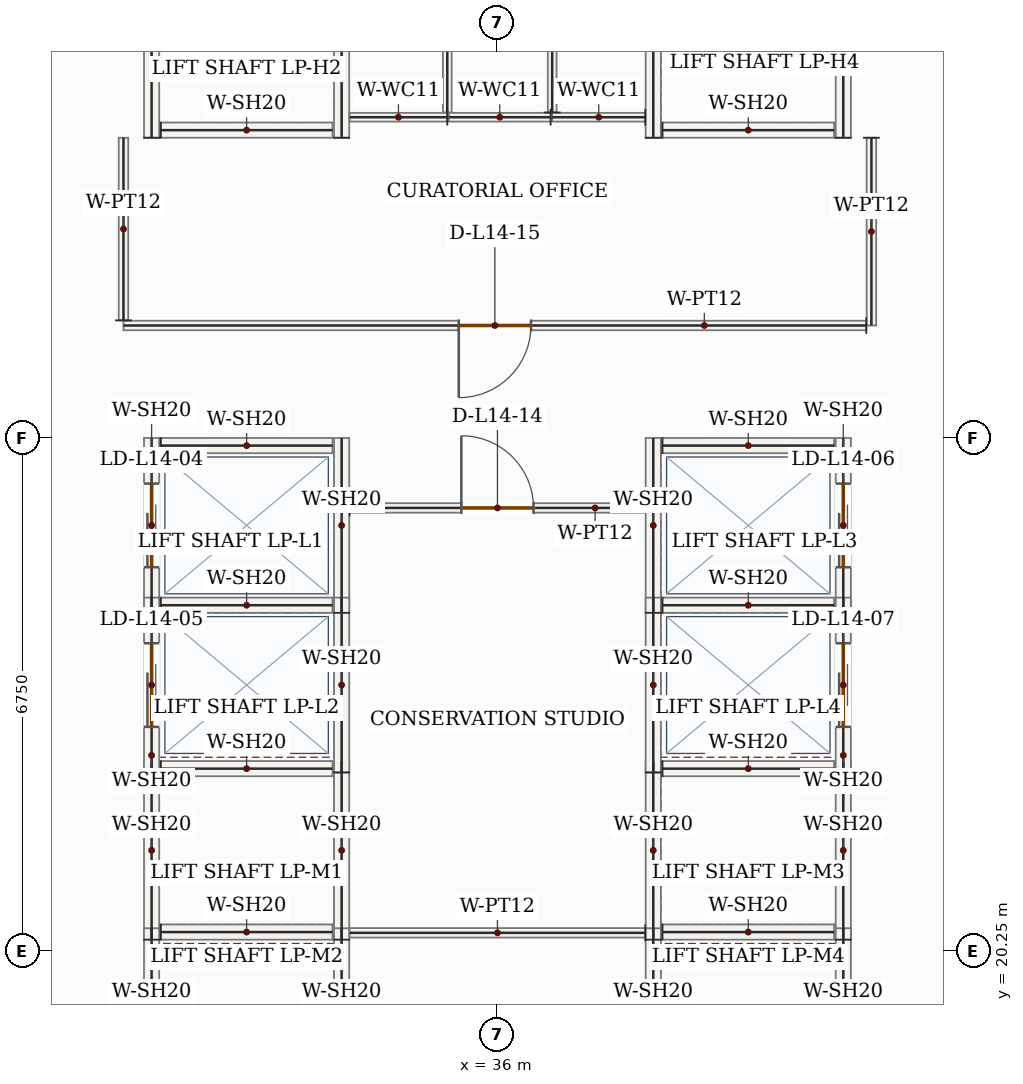
"""IFC4 building model, lengths in metres.
Left out: names, types, materials, properties, quantities, classifications, styles, units other than length and angle.
Written with IfcOpenShell. Run it as: python <this file> out.ifc"""

import sys

from ifc_helpers import new_model, si_unit, direction, frame, frame_2d, origin, place, context, subcontext, project, spatial, rectangle, extrude, source, transform, mapped, element, fill, save


model = new_model("IFC4")
c1 = context("Model", 3, precision=1e-05, world=origin(), true_north=direction((0.0, 1.0)))
c2 = subcontext(c1, "Body", "Model", "MODEL_VIEW")
j1 = project(units=[si_unit("LENGTHUNIT", "METRE"), si_unit("PLANEANGLEUNIT", "RADIAN")], contexts=[c1])
p1 = place(None, origin())
s1 = spatial("IfcSite", under=j1, at=p1, CompositionType="ELEMENT")
p2 = place(p1, origin())
s2 = spatial("IfcBuilding", under=s1, at=p2, CompositionType="ELEMENT")
p3 = place(p2, frame((0.0, 0.0, 66.9)))
s3 = spatial("IfcBuildingStorey", under=s2, at=p3, CompositionType="ELEMENT", Elevation=66.9)
m1 = source(origin(), c2, "Body", "SweptSolid", [
    extrude(rectangle(XDim=2.4, YDim=0.2, at=frame_2d((1.2, 0.0))), origin(), (0.0, 0.0, 1.0), 3.95),
])
for number, where, z_axis, x_axis in (
    (1, (31.45, 30.95, 0.0), (0.0, 0.0, 1.0), (0.0, 1.0, 0.0)),
    (2, (33.95, 30.95, 0.0), (0.0, 0.0, 1.0), (0.0, 1.0, 0.0)),
):
    element("IfcWall", number, at=place(p3, frame(where, z_axis=z_axis, x_axis=x_axis)), inside=s3, PredefinedType="SOLIDWALL", context=c2, shape_type="MappedRepresentation", body=[
        mapped(m1, transform((0.0, 0.0, 0.0), x_axis=(1.0, 0.0, 0.0), y_axis=(0.0, 1.0, 0.0), z_axis=(0.0, 0.0, 1.0), scale=1.0)),
    ])
m2 = source(origin(), c2, "Body", "SweptSolid", [
    extrude(rectangle(XDim=2.26, YDim=0.2, at=frame_2d((1.13, 0.0))), origin(), (0.0, 0.0, 1.0), 3.95),
])
p4 = place(p3, frame((31.57, 31.05, 0.0), z_axis=(0.0, 0.0, 1.0), x_axis=(1.0, 0.0, 0.0)))
e3 = element("IfcWall", 3, at=p4, inside=s3, PredefinedType="SOLIDWALL", context=c2, shape_type="MappedRepresentation", body=[
    mapped(m2, transform((0.0, 0.0, 0.0), x_axis=(1.0, 0.0, 0.0), y_axis=(0.0, 1.0, 0.0), z_axis=(0.0, 0.0, 1.0), scale=1.0)),
])
for number, where, z_axis, x_axis in (
    (4, (38.05, 30.95, 0.0), (0.0, 0.0, 1.0), (0.0, 1.0, 0.0)),
    (5, (40.55, 30.95, 0.0), (0.0, 0.0, 1.0), (0.0, 1.0, 0.0)),
):
    element("IfcWall", number, at=place(p3, frame(where, z_axis=z_axis, x_axis=x_axis)), inside=s3, PredefinedType="SOLIDWALL", context=c2, shape_type="MappedRepresentation", body=[
        mapped(m1, transform((0.0, 0.0, 0.0), x_axis=(1.0, 0.0, 0.0), y_axis=(0.0, 1.0, 0.0), z_axis=(0.0, 0.0, 1.0), scale=1.0)),
    ])
p5 = place(p3, frame((38.17, 31.05, 0.0), z_axis=(0.0, 0.0, 1.0), x_axis=(1.0, 0.0, 0.0)))
e6 = element("IfcWall", 6, at=p5, inside=s3, PredefinedType="SOLIDWALL", context=c2, shape_type="MappedRepresentation", body=[
    mapped(m2, transform((0.0, 0.0, 0.0), x_axis=(1.0, 0.0, 0.0), y_axis=(0.0, 1.0, 0.0), z_axis=(0.0, 0.0, 1.0), scale=1.0)),
])
m3 = source(origin(), c2, "Body", "SweptSolid", [
    extrude(rectangle(XDim=2.35, YDim=0.2, at=frame_2d((1.175, 0.0))), origin(), (0.0, 0.0, 1.0), 3.95),
])
for number, where, z_axis, x_axis in (
    (7, (31.45, 20.4, 0.0), (0.0, 0.0, 1.0), (0.0, 1.0, 0.0)),
    (8, (33.95, 20.4, 0.0), (0.0, 0.0, 1.0), (0.0, 1.0, 0.0)),
):
    element("IfcWall", number, at=place(p3, frame(where, z_axis=z_axis, x_axis=x_axis)), inside=s3, PredefinedType="SOLIDWALL", context=c2, shape_type="MappedRepresentation", body=[
        mapped(m3, transform((0.0, 0.0, 0.0), x_axis=(1.0, 0.0, 0.0), y_axis=(0.0, 1.0, 0.0), z_axis=(0.0, 0.0, 1.0), scale=1.0)),
    ])
for number, where, z_axis, x_axis in (
    (9, (31.57, 20.5, 0.0), (0.0, 0.0, 1.0), (1.0, 0.0, 0.0)),
    (10, (31.57, 22.65, 0.0), (0.0, 0.0, 1.0), (1.0, 0.0, 0.0)),
):
    element("IfcWall", number, at=place(p3, frame(where, z_axis=z_axis, x_axis=x_axis)), inside=s3, PredefinedType="SOLIDWALL", context=c2, shape_type="MappedRepresentation", body=[
        mapped(m2, transform((0.0, 0.0, 0.0), x_axis=(1.0, 0.0, 0.0), y_axis=(0.0, 1.0, 0.0), z_axis=(0.0, 0.0, 1.0), scale=1.0)),
    ])
for number, where, z_axis, x_axis in (
    (11, (31.45, 18.2, 0.0), (0.0, 0.0, 1.0), (0.0, 1.0, 0.0)),
    (12, (33.95, 18.2, 0.0), (0.0, 0.0, 1.0), (0.0, 1.0, 0.0)),
    (13, (38.05, 20.4, 0.0), (0.0, 0.0, 1.0), (0.0, 1.0, 0.0)),
    (14, (40.55, 20.4, 0.0), (0.0, 0.0, 1.0), (0.0, 1.0, 0.0)),
):
    element("IfcWall", number, at=place(p3, frame(where, z_axis=z_axis, x_axis=x_axis)), inside=s3, PredefinedType="SOLIDWALL", context=c2, shape_type="MappedRepresentation", body=[
        mapped(m3, transform((0.0, 0.0, 0.0), x_axis=(1.0, 0.0, 0.0), y_axis=(0.0, 1.0, 0.0), z_axis=(0.0, 0.0, 1.0), scale=1.0)),
    ])
for number, where, z_axis, x_axis in (
    (15, (38.17, 20.5, 0.0), (0.0, 0.0, 1.0), (1.0, 0.0, 0.0)),
    (16, (38.17, 22.65, 0.0), (0.0, 0.0, 1.0), (1.0, 0.0, 0.0)),
):
    element("IfcWall", number, at=place(p3, frame(where, z_axis=z_axis, x_axis=x_axis)), inside=s3, PredefinedType="SOLIDWALL", context=c2, shape_type="MappedRepresentation", body=[
        mapped(m2, transform((0.0, 0.0, 0.0), x_axis=(1.0, 0.0, 0.0), y_axis=(0.0, 1.0, 0.0), z_axis=(0.0, 0.0, 1.0), scale=1.0)),
    ])
for number, where, z_axis, x_axis in (
    (17, (38.05, 18.2, 0.0), (0.0, 0.0, 1.0), (0.0, 1.0, 0.0)),
    (18, (40.55, 18.2, 0.0), (0.0, 0.0, 1.0), (0.0, 1.0, 0.0)),
):
    element("IfcWall", number, at=place(p3, frame(where, z_axis=z_axis, x_axis=x_axis)), inside=s3, PredefinedType="SOLIDWALL", context=c2, shape_type="MappedRepresentation", body=[
        mapped(m3, transform((0.0, 0.0, 0.0), x_axis=(1.0, 0.0, 0.0), y_axis=(0.0, 1.0, 0.0), z_axis=(0.0, 0.0, 1.0), scale=1.0)),
    ])
p6 = place(p3, frame((31.45, 24.7, 0.0), z_axis=(0.0, 0.0, 1.0), x_axis=(0.0, 1.0, 0.0)))
e19 = element("IfcWall", 19, at=p6, inside=s3, PredefinedType="SOLIDWALL", context=c2, shape_type="SweptSolid", body=[
    extrude(rectangle(XDim=2.3, YDim=0.2, at=frame_2d((1.15, 0.0))), origin(), (0.0, 0.0, 1.0), 3.95),
])
p7 = place(p6, frame((0.6, 0.0, 0.0)))
e20 = element("IfcOpeningElement", 20, at=p7, cuts=e19, PredefinedType="OPENING", context=c2, shape_type="SweptSolid", body=[
    extrude(rectangle(XDim=1.1, YDim=2.15, at=frame_2d((0.55, 1.075))), frame((0.0, 0.11, 0.0), z_axis=(0.0, -1.0, 0.0), x_axis=(1.0, 0.0, 0.0)), (0.0, 0.0, 1.0), 0.22),
])
m4 = source(origin(), c2, "Body", "SweptSolid", [
    extrude(rectangle(XDim=2.3, YDim=0.2, at=frame_2d((1.15, 0.0))), origin(), (0.0, 0.0, 1.0), 3.95),
])
p8 = place(p3, frame((33.95, 24.7, 0.0), z_axis=(0.0, 0.0, 1.0), x_axis=(0.0, 1.0, 0.0)))
e21 = element("IfcWall", 21, at=p8, inside=s3, PredefinedType="SOLIDWALL", context=c2, shape_type="MappedRepresentation", body=[
    mapped(m4, transform((0.0, 0.0, 0.0), x_axis=(1.0, 0.0, 0.0), y_axis=(0.0, 1.0, 0.0), z_axis=(0.0, 0.0, 1.0), scale=1.0)),
])
for number, where, z_axis, x_axis in (
    (22, (31.57, 24.8, 0.0), (0.0, 0.0, 1.0), (1.0, 0.0, 0.0)),
    (23, (31.57, 26.9, 0.0), (0.0, 0.0, 1.0), (1.0, 0.0, 0.0)),
):
    element("IfcWall", number, at=place(p3, frame(where, z_axis=z_axis, x_axis=x_axis)), inside=s3, PredefinedType="SOLIDWALL", context=c2, shape_type="MappedRepresentation", body=[
        mapped(m2, transform((0.0, 0.0, 0.0), x_axis=(1.0, 0.0, 0.0), y_axis=(0.0, 1.0, 0.0), z_axis=(0.0, 0.0, 1.0), scale=1.0)),
    ])
p9 = place(p3, frame((31.45, 22.6, 0.0), z_axis=(0.0, 0.0, 1.0), x_axis=(0.0, 1.0, 0.0)))
e24 = element("IfcWall", 24, at=p9, inside=s3, PredefinedType="SOLIDWALL", context=c2, shape_type="SweptSolid", body=[
    extrude(rectangle(XDim=2.3, YDim=0.2, at=frame_2d((1.15, 0.0))), origin(), (0.0, 0.0, 1.0), 3.95),
])
p10 = place(p9, frame((0.6, 0.0, 0.0)))
e25 = element("IfcOpeningElement", 25, at=p10, cuts=e24, PredefinedType="OPENING", context=c2, shape_type="SweptSolid", body=[
    extrude(rectangle(XDim=1.1, YDim=2.15, at=frame_2d((0.55, 1.075))), frame((0.0, 0.11, 0.0), z_axis=(0.0, -1.0, 0.0), x_axis=(1.0, 0.0, 0.0)), (0.0, 0.0, 1.0), 0.22),
])
m5 = source(origin(), c2, "Body", "SweptSolid", [
    extrude(rectangle(XDim=2.3, YDim=0.2, at=frame_2d((1.15, 0.0))), origin(), (0.0, 0.0, 1.0), 3.95),
])
p11 = place(p3, frame((33.95, 22.6, 0.0), z_axis=(0.0, 0.0, 1.0), x_axis=(0.0, 1.0, 0.0)))
e26 = element("IfcWall", 26, at=p11, inside=s3, PredefinedType="SOLIDWALL", context=c2, shape_type="MappedRepresentation", body=[
    mapped(m5, transform((0.0, 0.0, 0.0), x_axis=(1.0, 0.0, 0.0), y_axis=(0.0, 1.0, 0.0), z_axis=(0.0, 0.0, 1.0), scale=1.0)),
])
p12 = place(p3, frame((38.05, 24.7, 0.0), z_axis=(0.0, 0.0, 1.0), x_axis=(0.0, 1.0, 0.0)))
e27 = element("IfcWall", 27, at=p12, inside=s3, PredefinedType="SOLIDWALL", context=c2, shape_type="MappedRepresentation", body=[
    mapped(m4, transform((0.0, 0.0, 0.0), x_axis=(1.0, 0.0, 0.0), y_axis=(0.0, 1.0, 0.0), z_axis=(0.0, 0.0, 1.0), scale=1.0)),
])
p13 = place(p3, frame((40.55, 24.7, 0.0), z_axis=(0.0, 0.0, 1.0), x_axis=(0.0, 1.0, 0.0)))
e28 = element("IfcWall", 28, at=p13, inside=s3, PredefinedType="SOLIDWALL", context=c2, shape_type="SweptSolid", body=[
    extrude(rectangle(XDim=2.3, YDim=0.2, at=frame_2d((1.15, 0.0))), origin(), (0.0, 0.0, 1.0), 3.95),
])
p14 = place(p13, frame((0.6, 0.0, 0.0)))
e29 = element("IfcOpeningElement", 29, at=p14, cuts=e28, PredefinedType="OPENING", context=c2, shape_type="SweptSolid", body=[
    extrude(rectangle(XDim=1.1, YDim=2.15, at=frame_2d((0.55, 1.075))), frame((0.0, 0.11, 0.0), z_axis=(0.0, -1.0, 0.0), x_axis=(1.0, 0.0, 0.0)), (0.0, 0.0, 1.0), 0.22),
])
for number, where, z_axis, x_axis in (
    (30, (38.17, 24.8, 0.0), (0.0, 0.0, 1.0), (1.0, 0.0, 0.0)),
    (31, (38.17, 26.9, 0.0), (0.0, 0.0, 1.0), (1.0, 0.0, 0.0)),
):
    element("IfcWall", number, at=place(p3, frame(where, z_axis=z_axis, x_axis=x_axis)), inside=s3, PredefinedType="SOLIDWALL", context=c2, shape_type="MappedRepresentation", body=[
        mapped(m2, transform((0.0, 0.0, 0.0), x_axis=(1.0, 0.0, 0.0), y_axis=(0.0, 1.0, 0.0), z_axis=(0.0, 0.0, 1.0), scale=1.0)),
    ])
p15 = place(p3, frame((38.05, 22.6, 0.0), z_axis=(0.0, 0.0, 1.0), x_axis=(0.0, 1.0, 0.0)))
e32 = element("IfcWall", 32, at=p15, inside=s3, PredefinedType="SOLIDWALL", context=c2, shape_type="MappedRepresentation", body=[
    mapped(m5, transform((0.0, 0.0, 0.0), x_axis=(1.0, 0.0, 0.0), y_axis=(0.0, 1.0, 0.0), z_axis=(0.0, 0.0, 1.0), scale=1.0)),
])
p16 = place(p3, frame((40.55, 22.6, 0.0), z_axis=(0.0, 0.0, 1.0), x_axis=(0.0, 1.0, 0.0)))
e33 = element("IfcWall", 33, at=p16, inside=s3, PredefinedType="SOLIDWALL", context=c2, shape_type="SweptSolid", body=[
    extrude(rectangle(XDim=2.3, YDim=0.2, at=frame_2d((1.15, 0.0))), origin(), (0.0, 0.0, 1.0), 3.95),
])
p17 = place(p16, frame((0.6, 0.0, 0.0)))
e34 = element("IfcOpeningElement", 34, at=p17, cuts=e33, PredefinedType="OPENING", context=c2, shape_type="SweptSolid", body=[
    extrude(rectangle(XDim=1.1, YDim=2.15, at=frame_2d((0.55, 1.075))), frame((0.0, 0.11, 0.0), z_axis=(0.0, -1.0, 0.0), x_axis=(1.0, 0.0, 0.0)), (0.0, 0.0, 1.0), 0.22),
])
m6 = source(origin(), c2, "Body", "SweptSolid", [
    extrude(rectangle(XDim=1.225, YDim=0.115, at=frame_2d((0.613, 0.0))), origin(), (0.0, 0.0, 1.0), 3.95),
])
p18 = place(p3, frame((37.945, 31.22, 0.0), z_axis=(0.0, 0.0, 1.0), x_axis=(-1.0, 0.0, 0.0)))
e35 = element("IfcWall", 35, at=p18, inside=s3, PredefinedType="PARTITIONING", context=c2, shape_type="MappedRepresentation", body=[
    mapped(m6, transform((0.0, 0.0, 0.0), x_axis=(1.0, 0.0, 0.0), y_axis=(0.0, 1.0, 0.0), z_axis=(0.0, 0.0, 1.0), scale=1.0)),
])
m7 = source(origin(), c2, "Body", "SweptSolid", [
    extrude(rectangle(XDim=3.998, YDim=0.115, at=frame_2d((1.999, 0.0))), origin(), (0.0, 0.0, 1.0), 3.95),
])
p19 = place(p3, frame((36.72, 31.282, 0.0), z_axis=(0.0, 0.0, 1.0), x_axis=(0.0, 1.0, 0.0)))
e36 = element("IfcWall", 36, at=p19, inside=s3, PredefinedType="PARTITIONING", context=c2, shape_type="MappedRepresentation", body=[
    mapped(m7, transform((0.0, 0.0, 0.0), x_axis=(1.0, 0.0, 0.0), y_axis=(0.0, 1.0, 0.0), z_axis=(0.0, 0.0, 1.0), scale=1.0)),
])
m8 = source(origin(), c2, "Body", "SweptSolid", [
    extrude(rectangle(XDim=1.285, YDim=0.115, at=frame_2d((0.643, 0.0))), origin(), (0.0, 0.0, 1.0), 3.95),
])
p20 = place(p3, frame((35.34, 31.22, 0.0), z_axis=(0.0, 0.0, 1.0), x_axis=(-1.0, 0.0, 0.0)))
e37 = element("IfcWall", 37, at=p20, inside=s3, PredefinedType="PARTITIONING", context=c2, shape_type="MappedRepresentation", body=[
    mapped(m8, transform((0.0, 0.0, 0.0), x_axis=(1.0, 0.0, 0.0), y_axis=(0.0, 1.0, 0.0), z_axis=(0.0, 0.0, 1.0), scale=1.0)),
])
m9 = source(origin(), c2, "Body", "SweptSolid", [
    extrude(rectangle(XDim=3.935, YDim=0.115, at=frame_2d((1.968, 0.0))), origin(), (0.0, 0.0, 1.0), 3.95),
])
p21 = place(p3, frame((35.34, 35.218, 0.0), z_axis=(0.0, 0.0, 1.0), x_axis=(0.0, -1.0, 0.0)))
e38 = element("IfcWall", 38, at=p21, inside=s3, PredefinedType="PARTITIONING", context=c2, shape_type="MappedRepresentation", body=[
    mapped(m9, transform((0.0, 0.0, 0.0), x_axis=(1.0, 0.0, 0.0), y_axis=(0.0, 1.0, 0.0), z_axis=(0.0, 0.0, 1.0), scale=1.0)),
])
m10 = source(origin(), c2, "Body", "SweptSolid", [
    extrude(rectangle(XDim=1.34, YDim=0.115, at=frame_2d((0.67, 0.0))), origin(), (0.0, 0.0, 1.0), 3.95),
])
p22 = place(p3, frame((36.7, 31.22, 0.0), z_axis=(0.0, 0.0, 1.0), x_axis=(-1.0, 0.0, 0.0)))
e39 = element("IfcWall", 39, at=p22, inside=s3, PredefinedType="PARTITIONING", context=c2, shape_type="MappedRepresentation", body=[
    mapped(m10, transform((0.0, 0.0, 0.0), x_axis=(1.0, 0.0, 0.0), y_axis=(0.0, 1.0, 0.0), z_axis=(0.0, 0.0, 1.0), scale=1.0)),
])
p23 = place(p3, frame((34.055, 26.08, 0.0), z_axis=(0.0, 0.0, 1.0), x_axis=(1.0, 0.0, 0.0)))
e40 = element("IfcWall", 40, at=p23, inside=s3, PredefinedType="PARTITIONING", context=c2, shape_type="SweptSolid", body=[
    extrude(rectangle(XDim=3.89, YDim=0.125, at=frame_2d((1.945, 0.0))), origin(), (0.0, 0.0, 1.0), 3.95),
])
p24 = place(p23, frame((1.47, 0.0, 0.0)))
e41 = element("IfcOpeningElement", 41, at=p24, cuts=e40, PredefinedType="OPENING", context=c2, shape_type="SweptSolid", body=[
    extrude(rectangle(XDim=0.95, YDim=2.15, at=frame_2d((0.475, 1.075))), frame((0.0, 0.073, 0.0), z_axis=(0.0, -1.0, 0.0), x_axis=(1.0, 0.0, 0.0)), (0.0, 0.0, 1.0), 0.145),
])
m11 = source(origin(), c2, "Body", "SweptSolid", [
    extrude(rectangle(XDim=3.89, YDim=0.125, at=frame_2d((1.945, 0.0))), origin(), (0.0, 0.0, 1.0), 3.95),
])
p25 = place(p3, frame((37.945, 20.49, 0.0), z_axis=(0.0, 0.0, 1.0), x_axis=(-1.0, 0.0, 0.0)))
e42 = element("IfcWall", 42, at=p25, inside=s3, PredefinedType="PARTITIONING", context=c2, shape_type="MappedRepresentation", body=[
    mapped(m11, transform((0.0, 0.0, 0.0), x_axis=(1.0, 0.0, 0.0), y_axis=(0.0, 1.0, 0.0), z_axis=(0.0, 0.0, 1.0), scale=1.0)),
])
m12 = source(origin(), c2, "Body", "SweptSolid", [
    extrude(rectangle(XDim=2.47, YDim=0.125, at=frame_2d((1.235, 0.0))), origin(), (0.0, 0.0, 1.0), 3.95),
])
p26 = place(p3, frame((40.92, 30.95, 0.0), z_axis=(0.0, 0.0, 1.0), x_axis=(0.0, -1.0, 0.0)))
e43 = element("IfcWall", 43, at=p26, inside=s3, PredefinedType="PARTITIONING", context=c2, shape_type="MappedRepresentation", body=[
    mapped(m12, transform((0.0, 0.0, 0.0), x_axis=(1.0, 0.0, 0.0), y_axis=(0.0, 1.0, 0.0), z_axis=(0.0, 0.0, 1.0), scale=1.0)),
])
p27 = place(p3, frame((40.853, 28.48, 0.0), z_axis=(0.0, 0.0, 1.0), x_axis=(-1.0, 0.0, 0.0)))
e44 = element("IfcWall", 44, at=p27, inside=s3, PredefinedType="PARTITIONING", context=c2, shape_type="SweptSolid", body=[
    extrude(rectangle(XDim=9.772, YDim=0.125, at=frame_2d((4.886, 0.0))), origin(), (0.0, 0.0, 1.0), 3.95),
])
p28 = place(p27, frame((4.411, 0.0, 0.0)))
e45 = element("IfcOpeningElement", 45, at=p28, cuts=e44, PredefinedType="OPENING", context=c2, shape_type="SweptSolid", body=[
    extrude(rectangle(XDim=0.95, YDim=2.15, at=frame_2d((0.475, 1.075))), frame((0.0, 0.073, 0.0), z_axis=(0.0, -1.0, 0.0), x_axis=(1.0, 0.0, 0.0)), (0.0, 0.0, 1.0), 0.145),
])
m13 = source(origin(), c2, "Body", "SweptSolid", [
    extrude(rectangle(XDim=2.402, YDim=0.125, at=frame_2d((1.201, 0.0))), origin(), (0.0, 0.0, 1.0), 3.95),
])
p29 = place(p3, frame((31.08, 28.548, 0.0), z_axis=(0.0, 0.0, 1.0), x_axis=(0.0, 1.0, 0.0)))
e46 = element("IfcWall", 46, at=p29, inside=s3, PredefinedType="PARTITIONING", context=c2, shape_type="MappedRepresentation", body=[
    mapped(m13, transform((0.0, 0.0, 0.0), x_axis=(1.0, 0.0, 0.0), y_axis=(0.0, 1.0, 0.0), z_axis=(0.0, 0.0, 1.0), scale=1.0)),
])
m14 = source(origin(), c2, "Body", "SweptSolid", [
    extrude(rectangle(XDim=1.1, YDim=2.15, at=frame_2d((0.55, 1.075))), frame((0.0, 0.025, 0.0), z_axis=(0.0, -1.0, 0.0), x_axis=(1.0, 0.0, 0.0)), (0.0, 0.0, 1.0), 0.05),
])
p30 = place(p7, origin())
e47 = element("IfcDoor", 47, at=p30, inside=s3, OperationType="DOUBLE_DOOR_SLIDING", PredefinedType="DOOR", context=c2, shape_type="MappedRepresentation", body=[
    mapped(m14, transform((0.0, 0.0, 0.0), x_axis=(1.0, 0.0, 0.0), y_axis=(0.0, 1.0, 0.0), z_axis=(0.0, 0.0, 1.0), scale=1.0)),
])
fill(e20, e47)
p31 = place(p10, origin())
e48 = element("IfcDoor", 48, at=p31, inside=s3, OperationType="DOUBLE_DOOR_SLIDING", PredefinedType="DOOR", context=c2, shape_type="MappedRepresentation", body=[
    mapped(m14, transform((0.0, 0.0, 0.0), x_axis=(1.0, 0.0, 0.0), y_axis=(0.0, 1.0, 0.0), z_axis=(0.0, 0.0, 1.0), scale=1.0)),
])
fill(e25, e48)
p32 = place(p14, origin())
e49 = element("IfcDoor", 49, at=p32, inside=s3, OperationType="DOUBLE_DOOR_SLIDING", PredefinedType="DOOR", context=c2, shape_type="MappedRepresentation", body=[
    mapped(m14, transform((0.0, 0.0, 0.0), x_axis=(1.0, 0.0, 0.0), y_axis=(0.0, 1.0, 0.0), z_axis=(0.0, 0.0, 1.0), scale=1.0)),
])
fill(e29, e49)
p33 = place(p17, origin())
e50 = element("IfcDoor", 50, at=p33, inside=s3, OperationType="DOUBLE_DOOR_SLIDING", PredefinedType="DOOR", context=c2, shape_type="MappedRepresentation", body=[
    mapped(m14, transform((0.0, 0.0, 0.0), x_axis=(1.0, 0.0, 0.0), y_axis=(0.0, 1.0, 0.0), z_axis=(0.0, 0.0, 1.0), scale=1.0)),
])
fill(e34, e50)
m15 = source(origin(), c2, "Body", "SweptSolid", [
    extrude(rectangle(XDim=0.95, YDim=2.15, at=frame_2d((0.475, 1.075))), frame((0.0, 0.025, 0.0), z_axis=(0.0, -1.0, 0.0), x_axis=(1.0, 0.0, 0.0)), (0.0, 0.0, 1.0), 0.05),
])
p34 = place(p24, origin())
e51 = element("IfcDoor", 51, at=p34, inside=s3, OperationType="SINGLE_SWING_LEFT", PredefinedType="DOOR", context=c2, shape_type="MappedRepresentation", body=[
    mapped(m15, transform((0.0, 0.0, 0.0), x_axis=(1.0, 0.0, 0.0), y_axis=(0.0, 1.0, 0.0), z_axis=(0.0, 0.0, 1.0), scale=1.0)),
])
fill(e41, e51)
p35 = place(p28, origin())
e52 = element("IfcDoor", 52, at=p35, inside=s3, OperationType="SINGLE_SWING_RIGHT", PredefinedType="DOOR", context=c2, shape_type="MappedRepresentation", body=[
    mapped(m15, transform((0.0, 0.0, 0.0), x_axis=(1.0, 0.0, 0.0), y_axis=(0.0, 1.0, 0.0), z_axis=(0.0, 0.0, 1.0), scale=1.0)),
])
fill(e45, e52)
save(model, sys.argv[1])
